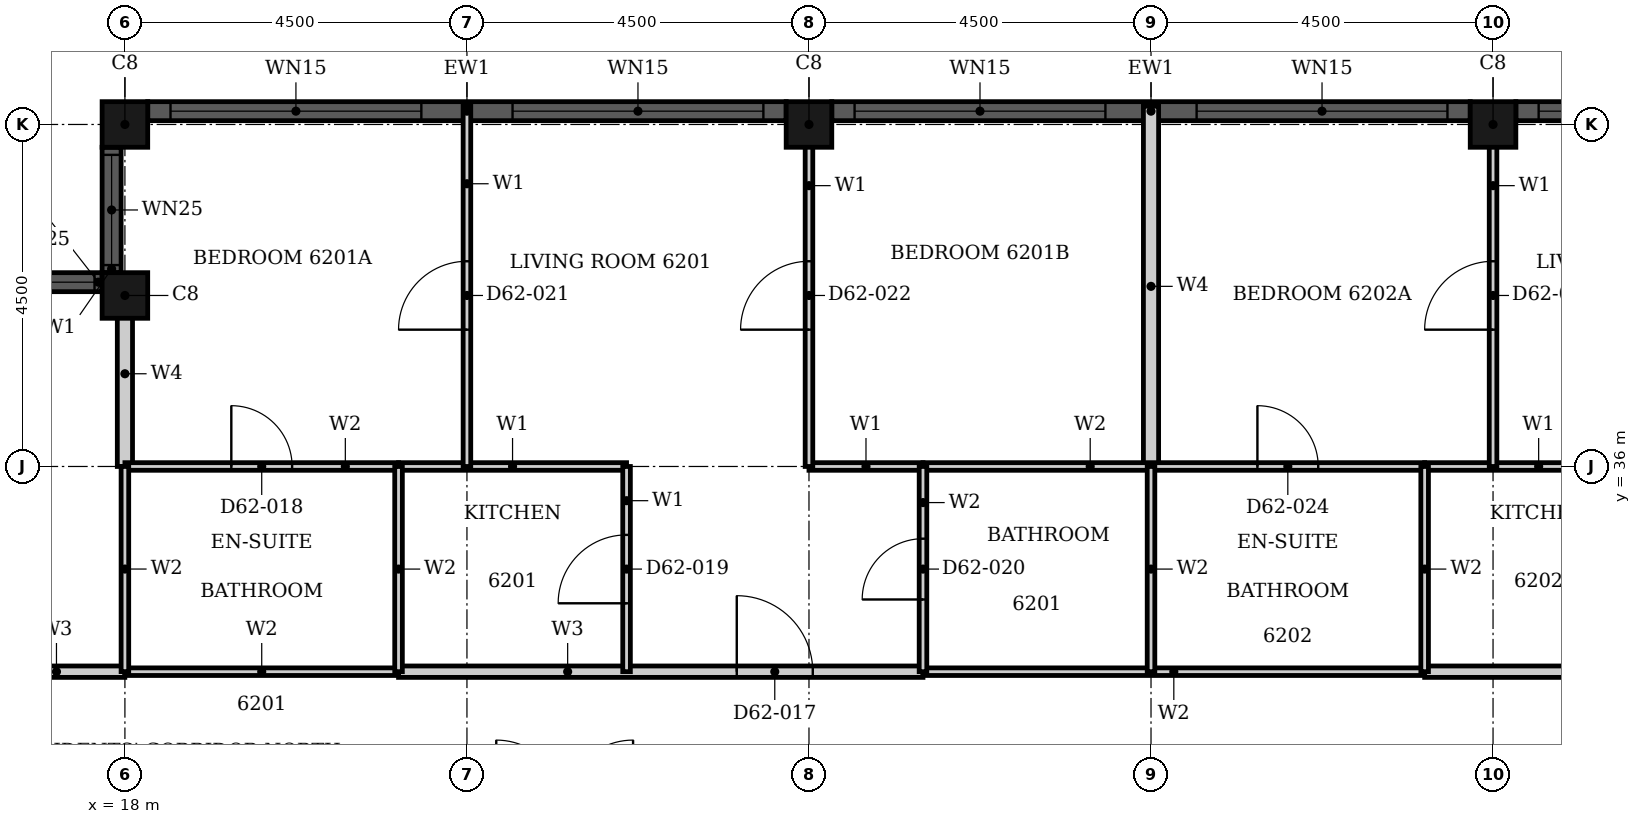
"""IFC4 building model, lengths in metres.
Left out: names, types, materials, properties, quantities, classifications, styles, units other than length and angle.
Written with IfcOpenShell. Run it as: python <this file> out.ifc"""

import sys

from ifc_helpers import new_model, si_unit, direction, frame, frame_2d, origin, origin_2d, place, context, subcontext, project, spatial, rectangle, hollow_rectangle, extrude, element, fill, save


model = new_model("IFC4")
c1 = context("Model", 3, precision=1e-05, world=origin(), true_north=direction((0.0, 1.0)))
c2 = subcontext(c1, "Body", "Model", "MODEL_VIEW")
j1 = project(units=[si_unit("LENGTHUNIT", "METRE"), si_unit("PLANEANGLEUNIT", "RADIAN")], contexts=[c1])
p1 = place(None, origin())
s1 = spatial("IfcSite", under=j1, at=p1, CompositionType="ELEMENT")
p2 = place(p1, origin())
s2 = spatial("IfcBuilding", under=s1, at=p2, CompositionType="ELEMENT")
p3 = place(p2, frame((0.0, 0.0, 245.3)))
s3 = spatial("IfcBuildingStorey", under=s2, at=p3, CompositionType="ELEMENT", Elevation=245.3)
for number, where, z_axis, x_axis in (
    (1, (36.0, 40.5, 0.0), (0.0, 0.0, 1.0), (1.0, 0.0, 0.0)),
    (2, (27.0, 40.5, 0.0), (0.0, 0.0, 1.0), (1.0, 0.0, 0.0)),
    (3, (18.0, 40.5, 0.0), (0.0, 0.0, 1.0), (1.0, 0.0, 0.0)),
    (4, (18.0, 38.25, 0.0), (0.0, 0.0, 1.0), (1.0, 0.0, 0.0)),
):
    element("IfcColumn", number, at=place(p3, frame(where, z_axis=z_axis, x_axis=x_axis)), inside=s3, PredefinedType="COLUMN", context=c2, shape_type="SweptSolid", body=[
        extrude(hollow_rectangle(XDim=0.6, YDim=0.6, WallThickness=0.02, at=origin_2d()), origin(), (0.0, 0.0, 1.0), 3.7),
    ])
p4 = place(p3, frame((44.7, 40.675, 0.0), z_axis=(0.0, 0.0, 1.0), x_axis=(-1.0, 0.0, 0.0)))
e5 = element("IfcWall", 5, at=p4, inside=s3, PredefinedType="SOLIDWALL", context=c2, shape_type="SweptSolid", body=[
    extrude(rectangle(XDim=8.4, YDim=0.25, at=frame_2d((4.2, 0.0))), origin(), (0.0, 0.0, 1.0), 3.7),
])
p5 = place(p4, frame((0.3, 0.0, 0.45)))
e6 = element("IfcOpeningElement", 6, at=p5, cuts=e5, PredefinedType="OPENING", context=c2, shape_type="SweptSolid", body=[
    extrude(rectangle(XDim=3.3, YDim=2.3, at=frame_2d((1.65, 1.15))), frame((0.0, 0.135, 0.0), z_axis=(0.0, -1.0, 0.0), x_axis=(1.0, 0.0, 0.0)), (0.0, 0.0, 1.0), 0.27),
])
p6 = place(p4, frame((4.8, 0.0, 0.45)))
e7 = element("IfcOpeningElement", 7, at=p6, cuts=e5, PredefinedType="OPENING", context=c2, shape_type="SweptSolid", body=[
    extrude(rectangle(XDim=3.3, YDim=2.3, at=frame_2d((1.65, 1.15))), frame((0.0, 0.135, 0.0), z_axis=(0.0, -1.0, 0.0), x_axis=(1.0, 0.0, 0.0)), (0.0, 0.0, 1.0), 0.27),
])
p7 = place(p3, frame((35.7, 40.675, 0.0), z_axis=(0.0, 0.0, 1.0), x_axis=(-1.0, 0.0, 0.0)))
e8 = element("IfcWall", 8, at=p7, inside=s3, PredefinedType="SOLIDWALL", context=c2, shape_type="SweptSolid", body=[
    extrude(rectangle(XDim=8.4, YDim=0.25, at=frame_2d((4.2, 0.0))), origin(), (0.0, 0.0, 1.0), 3.7),
])
p8 = place(p7, frame((0.3, 0.0, 0.45)))
e9 = element("IfcOpeningElement", 9, at=p8, cuts=e8, PredefinedType="OPENING", context=c2, shape_type="SweptSolid", body=[
    extrude(rectangle(XDim=3.3, YDim=2.3, at=frame_2d((1.65, 1.15))), frame((0.0, 0.135, 0.0), z_axis=(0.0, -1.0, 0.0), x_axis=(1.0, 0.0, 0.0)), (0.0, 0.0, 1.0), 0.27),
])
p9 = place(p7, frame((4.8, 0.0, 0.45)))
e10 = element("IfcOpeningElement", 10, at=p9, cuts=e8, PredefinedType="OPENING", context=c2, shape_type="SweptSolid", body=[
    extrude(rectangle(XDim=3.3, YDim=2.3, at=frame_2d((1.65, 1.15))), frame((0.0, 0.135, 0.0), z_axis=(0.0, -1.0, 0.0), x_axis=(1.0, 0.0, 0.0)), (0.0, 0.0, 1.0), 0.27),
])
p10 = place(p3, frame((26.7, 40.675, 0.0), z_axis=(0.0, 0.0, 1.0), x_axis=(-1.0, 0.0, 0.0)))
e11 = element("IfcWall", 11, at=p10, inside=s3, PredefinedType="SOLIDWALL", context=c2, shape_type="SweptSolid", body=[
    extrude(rectangle(XDim=8.4, YDim=0.25, at=frame_2d((4.2, 0.0))), origin(), (0.0, 0.0, 1.0), 3.7),
])
p11 = place(p10, frame((0.3, 0.0, 0.45)))
e12 = element("IfcOpeningElement", 12, at=p11, cuts=e11, PredefinedType="OPENING", context=c2, shape_type="SweptSolid", body=[
    extrude(rectangle(XDim=3.3, YDim=2.3, at=frame_2d((1.65, 1.15))), frame((0.0, 0.135, 0.0), z_axis=(0.0, -1.0, 0.0), x_axis=(1.0, 0.0, 0.0)), (0.0, 0.0, 1.0), 0.27),
])
p12 = place(p10, frame((4.8, 0.0, 0.45)))
e13 = element("IfcOpeningElement", 13, at=p12, cuts=e11, PredefinedType="OPENING", context=c2, shape_type="SweptSolid", body=[
    extrude(rectangle(XDim=3.3, YDim=2.3, at=frame_2d((1.65, 1.15))), frame((0.0, 0.135, 0.0), z_axis=(0.0, -1.0, 0.0), x_axis=(1.0, 0.0, 0.0)), (0.0, 0.0, 1.0), 0.27),
])
p13 = place(p3, frame((17.825, 40.2, 0.0), z_axis=(0.0, 0.0, 1.0), x_axis=(0.0, -1.0, 0.0)))
e14 = element("IfcWall", 14, at=p13, inside=s3, PredefinedType="SOLIDWALL", context=c2, shape_type="SweptSolid", body=[
    extrude(rectangle(XDim=1.65, YDim=0.25, at=frame_2d((0.825, 0.0))), origin(), (0.0, 0.0, 1.0), 3.7),
])
p14 = place(p13, frame((0.1, 0.0, 0.9)))
e15 = element("IfcOpeningElement", 15, at=p14, cuts=e14, PredefinedType="OPENING", context=c2, shape_type="SweptSolid", body=[
    extrude(rectangle(XDim=1.45, YDim=1.85, at=frame_2d((0.725, 0.925))), frame((0.0, 0.135, 0.0), z_axis=(0.0, -1.0, 0.0), x_axis=(1.0, 0.0, 0.0)), (0.0, 0.0, 1.0), 0.27),
])
p15 = place(p3, frame((17.7, 38.425, 0.0), z_axis=(0.0, 0.0, 1.0), x_axis=(-1.0, 0.0, 0.0)))
e16 = element("IfcWall", 16, at=p15, inside=s3, PredefinedType="SOLIDWALL", context=c2, shape_type="SweptSolid", body=[
    extrude(rectangle(XDim=1.65, YDim=0.25, at=frame_2d((0.825, 0.0))), origin(), (0.0, 0.0, 1.0), 3.7),
])
p16 = place(p15, frame((0.1, 0.0, 0.9)))
e17 = element("IfcOpeningElement", 17, at=p16, cuts=e16, PredefinedType="OPENING", context=c2, shape_type="SweptSolid", body=[
    extrude(rectangle(XDim=1.45, YDim=1.85, at=frame_2d((0.725, 0.925))), frame((0.0, 0.135, 0.0), z_axis=(0.0, -1.0, 0.0), x_axis=(1.0, 0.0, 0.0)), (0.0, 0.0, 1.0), 0.27),
])
p17 = place(p3, frame((21.6, 33.3, 0.0), z_axis=(0.0, 0.0, 1.0), x_axis=(1.0, 0.0, 0.0)))
e18 = element("IfcWall", 18, at=p17, inside=s3, PredefinedType="PARTITIONING", context=c2, shape_type="SweptSolid", body=[
    extrude(rectangle(XDim=6.9, YDim=0.15, at=frame_2d((3.45, 0.0))), origin(), (0.0, 0.0, 1.0), 3.4),
])
p18 = place(p17, frame((4.45, 0.0, 0.0)))
e19 = element("IfcOpeningElement", 19, at=p18, cuts=e18, PredefinedType="OPENING", context=c2, shape_type="SweptSolid", body=[
    extrude(rectangle(XDim=1.0, YDim=2.2, at=frame_2d((0.5, 1.1))), frame((0.0, 0.085, 0.0), z_axis=(0.0, -1.0, 0.0), x_axis=(1.0, 0.0, 0.0)), (0.0, 0.0, 1.0), 0.17),
])
p19 = place(p3, frame((35.1, 33.3, 0.0), z_axis=(0.0, 0.0, 1.0), x_axis=(1.0, 0.0, 0.0)))
e20 = element("IfcWall", 20, at=p19, inside=s3, PredefinedType="PARTITIONING", context=c2, shape_type="SweptSolid", body=[
    extrude(rectangle(XDim=6.9, YDim=0.15, at=frame_2d((3.45, 0.0))), origin(), (0.0, 0.0, 1.0), 3.4),
])
p20 = place(p19, frame((4.45, 0.0, 0.0)))
e21 = element("IfcOpeningElement", 21, at=p20, cuts=e20, PredefinedType="OPENING", context=c2, shape_type="SweptSolid", body=[
    extrude(rectangle(XDim=1.0, YDim=2.2, at=frame_2d((0.5, 1.1))), frame((0.0, 0.085, 0.0), z_axis=(0.0, -1.0, 0.0), x_axis=(1.0, 0.0, 0.0)), (0.0, 0.0, 1.0), 0.17),
])
p21 = place(p3, frame((16.2, 33.3, 0.0), z_axis=(0.0, 0.0, 1.0), x_axis=(1.0, 0.0, 0.0)))
e22 = element("IfcWall", 22, at=p21, inside=s3, PredefinedType="PARTITIONING", context=c2, shape_type="SweptSolid", body=[
    extrude(rectangle(XDim=1.799, YDim=0.15, at=frame_2d((0.899, 0.0))), origin(), (0.0, 0.0, 1.0), 3.4),
])
p22 = place(p3, frame((27.0, 36.0, 0.0), z_axis=(0.0, 0.0, 1.0), x_axis=(1.0, 0.0, 0.0)))
e23 = element("IfcWall", 23, at=p22, inside=s3, PredefinedType="PARTITIONING", context=c2, shape_type="SweptSolid", body=[
    extrude(rectangle(XDim=1.5, YDim=0.1, at=frame_2d((0.75, 0.0))), origin(), (0.0, 0.0, 1.0), 3.4),
])
for number, where, z_axis, x_axis in (
    (24, (21.6, 36.0, 0.0), (0.0, 0.0, 1.0), (1.0, 0.0, 0.0)),
    (25, (35.1, 36.0, 0.0), (0.0, 0.0, 1.0), (1.0, 0.0, 0.0)),
):
    element("IfcWall", number, at=place(p3, frame(where, z_axis=z_axis, x_axis=x_axis)), inside=s3, PredefinedType="PARTITIONING", context=c2, shape_type="SweptSolid", body=[
        extrude(rectangle(XDim=3.0, YDim=0.1, at=frame_2d((1.5, 0.0))), origin(), (0.0, 0.0, 1.0), 3.4),
    ])
p23 = place(p3, frame((22.5, 36.0, 0.0), z_axis=(0.0, 0.0, 1.0), x_axis=(0.0, 1.0, 0.0)))
e26 = element("IfcWall", 26, at=p23, inside=s3, PredefinedType="PARTITIONING", context=c2, shape_type="SweptSolid", body=[
    extrude(rectangle(XDim=4.74, YDim=0.1, at=frame_2d((2.37, 0.0))), origin(), (0.0, 0.0, 1.0), 3.4),
])
p24 = place(p23, frame((1.8, 0.0, 0.0)))
e27 = element("IfcOpeningElement", 27, at=p24, cuts=e26, PredefinedType="OPENING", context=c2, shape_type="SweptSolid", body=[
    extrude(rectangle(XDim=0.9, YDim=2.1, at=frame_2d((0.45, 1.05))), frame((0.0, 0.06, 0.0), z_axis=(0.0, -1.0, 0.0), x_axis=(1.0, 0.0, 0.0)), (0.0, 0.0, 1.0), 0.12),
])
p25 = place(p3, frame((24.6, 33.3, 0.0), z_axis=(0.0, 0.0, 1.0), x_axis=(0.0, 1.0, 0.0)))
e28 = element("IfcWall", 28, at=p25, inside=s3, PredefinedType="PARTITIONING", context=c2, shape_type="SweptSolid", body=[
    extrude(rectangle(XDim=2.7, YDim=0.1, at=frame_2d((1.35, 0.0))), origin(), (0.0, 0.0, 1.0), 3.4),
])
p26 = place(p25, frame((0.9, 0.0, 0.0)))
e29 = element("IfcOpeningElement", 29, at=p26, cuts=e28, PredefinedType="OPENING", context=c2, shape_type="SweptSolid", body=[
    extrude(rectangle(XDim=0.9, YDim=2.1, at=frame_2d((0.45, 1.05))), frame((0.0, 0.06, 0.0), z_axis=(0.0, -1.0, 0.0), x_axis=(1.0, 0.0, 0.0)), (0.0, 0.0, 1.0), 0.12),
])
p27 = place(p3, frame((27.0, 36.0, 0.0), z_axis=(0.0, 0.0, 1.0), x_axis=(0.0, 1.0, 0.0)))
e30 = element("IfcWall", 30, at=p27, inside=s3, PredefinedType="PARTITIONING", context=c2, shape_type="SweptSolid", body=[
    extrude(rectangle(XDim=4.69, YDim=0.1, at=frame_2d((2.345, 0.0))), origin(), (0.0, 0.0, 1.0), 3.4),
])
p28 = place(p27, frame((1.8, 0.0, 0.0)))
e31 = element("IfcOpeningElement", 31, at=p28, cuts=e30, PredefinedType="OPENING", context=c2, shape_type="SweptSolid", body=[
    extrude(rectangle(XDim=0.9, YDim=2.1, at=frame_2d((0.45, 1.05))), frame((0.0, 0.06, 0.0), z_axis=(0.0, -1.0, 0.0), x_axis=(1.0, 0.0, 0.0)), (0.0, 0.0, 1.0), 0.12),
])
p29 = place(p3, frame((36.0, 36.0, 0.0), z_axis=(0.0, 0.0, 1.0), x_axis=(0.0, 1.0, 0.0)))
e32 = element("IfcWall", 32, at=p29, inside=s3, PredefinedType="PARTITIONING", context=c2, shape_type="SweptSolid", body=[
    extrude(rectangle(XDim=4.69, YDim=0.1, at=frame_2d((2.345, 0.0))), origin(), (0.0, 0.0, 1.0), 3.4),
])
p30 = place(p29, frame((1.8, 0.0, 0.0)))
e33 = element("IfcOpeningElement", 33, at=p30, cuts=e32, PredefinedType="OPENING", context=c2, shape_type="SweptSolid", body=[
    extrude(rectangle(XDim=0.9, YDim=2.1, at=frame_2d((0.45, 1.05))), frame((0.0, 0.06, 0.0), z_axis=(0.0, -1.0, 0.0), x_axis=(1.0, 0.0, 0.0)), (0.0, 0.0, 1.0), 0.12),
])
p31 = place(p3, frame((18.0, 36.0, 0.0), z_axis=(0.0, 0.0, 1.0), x_axis=(0.0, 1.0, 0.0)))
e34 = element("IfcWall", 34, at=p31, inside=s3, PredefinedType="PARTITIONING", context=c2, shape_type="SweptSolid", body=[
    extrude(rectangle(XDim=2.44, YDim=0.2, at=frame_2d((1.22, 0.0))), origin(), (0.0, 0.0, 1.0), 3.4),
])
p32 = place(p3, frame((31.5, 36.0, 0.0), z_axis=(0.0, 0.0, 1.0), x_axis=(0.0, 1.0, 0.0)))
e35 = element("IfcWall", 35, at=p32, inside=s3, PredefinedType="PARTITIONING", context=c2, shape_type="SweptSolid", body=[
    extrude(rectangle(XDim=4.74, YDim=0.2, at=frame_2d((2.37, 0.0))), origin(), (0.0, 0.0, 1.0), 3.4),
])
p33 = place(p3, frame((28.5, 33.3, 0.0), z_axis=(0.0, 0.0, 1.0), x_axis=(1.0, 0.0, 0.0)))
e36 = element("IfcWall", 36, at=p33, inside=s3, PredefinedType="PARTITIONING", context=c2, shape_type="SweptSolid", body=[
    extrude(rectangle(XDim=6.6, YDim=0.1, at=frame_2d((3.3, 0.0))), origin(), (0.0, 0.0, 1.0), 3.4),
])
p34 = place(p3, frame((18.0, 33.3, 0.0), z_axis=(0.0, 0.0, 1.0), x_axis=(1.0, 0.0, 0.0)))
e37 = element("IfcWall", 37, at=p34, inside=s3, PredefinedType="PARTITIONING", context=c2, shape_type="SweptSolid", body=[
    extrude(rectangle(XDim=3.6, YDim=0.1, at=frame_2d((1.8, 0.0))), origin(), (0.0, 0.0, 1.0), 3.4),
])
p35 = place(p3, frame((28.5, 36.0, 0.0), z_axis=(0.0, 0.0, 1.0), x_axis=(1.0, 0.0, 0.0)))
e38 = element("IfcWall", 38, at=p35, inside=s3, PredefinedType="PARTITIONING", context=c2, shape_type="SweptSolid", body=[
    extrude(rectangle(XDim=6.6, YDim=0.1, at=frame_2d((3.3, 0.0))), origin(), (0.0, 0.0, 1.0), 3.4),
])
p36 = place(p35, frame((4.4, 0.0, 0.0)))
e39 = element("IfcOpeningElement", 39, at=p36, cuts=e38, PredefinedType="OPENING", context=c2, shape_type="SweptSolid", body=[
    extrude(rectangle(XDim=0.8, YDim=2.1, at=frame_2d((0.4, 1.05))), frame((0.0, 0.06, 0.0), z_axis=(0.0, -1.0, 0.0), x_axis=(1.0, 0.0, 0.0)), (0.0, 0.0, 1.0), 0.12),
])
p37 = place(p3, frame((18.0, 36.0, 0.0), z_axis=(0.0, 0.0, 1.0), x_axis=(1.0, 0.0, 0.0)))
e40 = element("IfcWall", 40, at=p37, inside=s3, PredefinedType="PARTITIONING", context=c2, shape_type="SweptSolid", body=[
    extrude(rectangle(XDim=3.6, YDim=0.1, at=frame_2d((1.8, 0.0))), origin(), (0.0, 0.0, 1.0), 3.4),
])
p38 = place(p37, frame((1.4, 0.0, 0.0)))
e41 = element("IfcOpeningElement", 41, at=p38, cuts=e40, PredefinedType="OPENING", context=c2, shape_type="SweptSolid", body=[
    extrude(rectangle(XDim=0.8, YDim=2.1, at=frame_2d((0.4, 1.05))), frame((0.0, 0.06, 0.0), z_axis=(0.0, -1.0, 0.0), x_axis=(1.0, 0.0, 0.0)), (0.0, 0.0, 1.0), 0.12),
])
p39 = place(p3, frame((18.0, 33.301, 0.0), z_axis=(0.0, 0.0, 1.0), x_axis=(0.0, 1.0, 0.0)))
e42 = element("IfcWall", 42, at=p39, inside=s3, PredefinedType="PARTITIONING", context=c2, shape_type="SweptSolid", body=[
    extrude(rectangle(XDim=2.699, YDim=0.1, at=frame_2d((1.35, 0.0))), origin(), (0.0, 0.0, 1.0), 3.4),
])
p40 = place(p3, frame((21.6, 33.3, 0.0), z_axis=(0.0, 0.0, 1.0), x_axis=(0.0, 1.0, 0.0)))
e43 = element("IfcWall", 43, at=p40, inside=s3, PredefinedType="PARTITIONING", context=c2, shape_type="SweptSolid", body=[
    extrude(rectangle(XDim=2.7, YDim=0.1, at=frame_2d((1.35, 0.0))), origin(), (0.0, 0.0, 1.0), 3.4),
])
p41 = place(p3, frame((28.5, 33.3, 0.0), z_axis=(0.0, 0.0, 1.0), x_axis=(0.0, 1.0, 0.0)))
e44 = element("IfcWall", 44, at=p41, inside=s3, PredefinedType="PARTITIONING", context=c2, shape_type="SweptSolid", body=[
    extrude(rectangle(XDim=2.7, YDim=0.1, at=frame_2d((1.35, 0.0))), origin(), (0.0, 0.0, 1.0), 3.4),
])
p42 = place(p41, frame((0.95, 0.0, 0.0)))
e45 = element("IfcOpeningElement", 45, at=p42, cuts=e44, PredefinedType="OPENING", context=c2, shape_type="SweptSolid", body=[
    extrude(rectangle(XDim=0.8, YDim=2.1, at=frame_2d((0.4, 1.05))), frame((0.0, 0.06, 0.0), z_axis=(0.0, -1.0, 0.0), x_axis=(1.0, 0.0, 0.0)), (0.0, 0.0, 1.0), 0.12),
])
for number, where, z_axis, x_axis in (
    (46, (31.5, 33.3, 0.0), (0.0, 0.0, 1.0), (0.0, 1.0, 0.0)),
    (47, (35.1, 33.3, 0.0), (0.0, 0.0, 1.0), (0.0, 1.0, 0.0)),
):
    element("IfcWall", number, at=place(p3, frame(where, z_axis=z_axis, x_axis=x_axis)), inside=s3, PredefinedType="PARTITIONING", context=c2, shape_type="SweptSolid", body=[
        extrude(rectangle(XDim=2.7, YDim=0.1, at=frame_2d((1.35, 0.0))), origin(), (0.0, 0.0, 1.0), 3.4),
    ])
p43 = place(p6, origin())
e48 = element("IfcWindow", 48, at=p43, inside=s3, PartitioningType="SINGLE_PANEL", PredefinedType="WINDOW", context=c2, shape_type="SweptSolid", body=[
    extrude(rectangle(XDim=3.3, YDim=2.3, at=frame_2d((1.65, 1.15))), frame((0.0, 0.03, 0.0), z_axis=(0.0, -1.0, 0.0), x_axis=(1.0, 0.0, 0.0)), (0.0, 0.0, 1.0), 0.06),
])
fill(e7, e48)
p44 = place(p8, origin())
e49 = element("IfcWindow", 49, at=p44, inside=s3, PartitioningType="SINGLE_PANEL", PredefinedType="WINDOW", context=c2, shape_type="SweptSolid", body=[
    extrude(rectangle(XDim=3.3, YDim=2.3, at=frame_2d((1.65, 1.15))), frame((0.0, 0.03, 0.0), z_axis=(0.0, -1.0, 0.0), x_axis=(1.0, 0.0, 0.0)), (0.0, 0.0, 1.0), 0.06),
])
fill(e9, e49)
p45 = place(p9, origin())
e50 = element("IfcWindow", 50, at=p45, inside=s3, PartitioningType="SINGLE_PANEL", PredefinedType="WINDOW", context=c2, shape_type="SweptSolid", body=[
    extrude(rectangle(XDim=3.3, YDim=2.3, at=frame_2d((1.65, 1.15))), frame((0.0, 0.03, 0.0), z_axis=(0.0, -1.0, 0.0), x_axis=(1.0, 0.0, 0.0)), (0.0, 0.0, 1.0), 0.06),
])
fill(e10, e50)
p46 = place(p11, origin())
e51 = element("IfcWindow", 51, at=p46, inside=s3, PartitioningType="SINGLE_PANEL", PredefinedType="WINDOW", context=c2, shape_type="SweptSolid", body=[
    extrude(rectangle(XDim=3.3, YDim=2.3, at=frame_2d((1.65, 1.15))), frame((0.0, 0.03, 0.0), z_axis=(0.0, -1.0, 0.0), x_axis=(1.0, 0.0, 0.0)), (0.0, 0.0, 1.0), 0.06),
])
fill(e12, e51)
p47 = place(p12, origin())
e52 = element("IfcWindow", 52, at=p47, inside=s3, PartitioningType="SINGLE_PANEL", PredefinedType="WINDOW", context=c2, shape_type="SweptSolid", body=[
    extrude(rectangle(XDim=3.3, YDim=2.3, at=frame_2d((1.65, 1.15))), frame((0.0, 0.03, 0.0), z_axis=(0.0, -1.0, 0.0), x_axis=(1.0, 0.0, 0.0)), (0.0, 0.0, 1.0), 0.06),
])
fill(e13, e52)
p48 = place(p14, origin())
e53 = element("IfcWindow", 53, at=p48, inside=s3, PartitioningType="SINGLE_PANEL", PredefinedType="WINDOW", context=c2, shape_type="SweptSolid", body=[
    extrude(rectangle(XDim=1.45, YDim=1.85, at=frame_2d((0.725, 0.925))), frame((0.0, 0.03, 0.0), z_axis=(0.0, -1.0, 0.0), x_axis=(1.0, 0.0, 0.0)), (0.0, 0.0, 1.0), 0.06),
])
fill(e15, e53)
p49 = place(p16, origin())
e54 = element("IfcWindow", 54, at=p49, inside=s3, PartitioningType="SINGLE_PANEL", PredefinedType="WINDOW", context=c2, shape_type="SweptSolid", body=[
    extrude(rectangle(XDim=1.45, YDim=1.85, at=frame_2d((0.725, 0.925))), frame((0.0, 0.03, 0.0), z_axis=(0.0, -1.0, 0.0), x_axis=(1.0, 0.0, 0.0)), (0.0, 0.0, 1.0), 0.06),
])
fill(e17, e54)
p50 = place(p18, origin())
e55 = element("IfcDoor", 55, at=p50, inside=s3, OperationType="SINGLE_SWING_LEFT", PredefinedType="DOOR", context=c2, shape_type="SweptSolid", body=[
    extrude(rectangle(XDim=1.0, YDim=2.2, at=frame_2d((0.5, 1.1))), frame((0.0, 0.025, 0.0), z_axis=(0.0, -1.0, 0.0), x_axis=(1.0, 0.0, 0.0)), (0.0, 0.0, 1.0), 0.05),
])
fill(e19, e55)
p51 = place(p38, origin())
e56 = element("IfcDoor", 56, at=p51, inside=s3, OperationType="SINGLE_SWING_LEFT", PredefinedType="DOOR", context=c2, shape_type="SweptSolid", body=[
    extrude(rectangle(XDim=0.8, YDim=2.1, at=frame_2d((0.4, 1.05))), frame((0.0, 0.025, 0.0), z_axis=(0.0, -1.0, 0.0), x_axis=(1.0, 0.0, 0.0)), (0.0, 0.0, 1.0), 0.05),
])
fill(e41, e56)
p52 = place(p26, origin())
e57 = element("IfcDoor", 57, at=p52, inside=s3, OperationType="SINGLE_SWING_LEFT", PredefinedType="DOOR", context=c2, shape_type="SweptSolid", body=[
    extrude(rectangle(XDim=0.9, YDim=2.1, at=frame_2d((0.45, 1.05))), frame((0.0, 0.025, 0.0), z_axis=(0.0, -1.0, 0.0), x_axis=(1.0, 0.0, 0.0)), (0.0, 0.0, 1.0), 0.05),
])
fill(e29, e57)
p53 = place(p42, origin())
e58 = element("IfcDoor", 58, at=p53, inside=s3, OperationType="SINGLE_SWING_LEFT", PredefinedType="DOOR", context=c2, shape_type="SweptSolid", body=[
    extrude(rectangle(XDim=0.8, YDim=2.1, at=frame_2d((0.4, 1.05))), frame((0.0, 0.025, 0.0), z_axis=(0.0, -1.0, 0.0), x_axis=(1.0, 0.0, 0.0)), (0.0, 0.0, 1.0), 0.05),
])
fill(e45, e58)
p54 = place(p24, origin())
e59 = element("IfcDoor", 59, at=p54, inside=s3, OperationType="SINGLE_SWING_RIGHT", PredefinedType="DOOR", context=c2, shape_type="SweptSolid", body=[
    extrude(rectangle(XDim=0.9, YDim=2.1, at=frame_2d((0.45, 1.05))), frame((0.0, 0.025, 0.0), z_axis=(0.0, -1.0, 0.0), x_axis=(1.0, 0.0, 0.0)), (0.0, 0.0, 1.0), 0.05),
])
fill(e27, e59)
p55 = place(p28, origin())
e60 = element("IfcDoor", 60, at=p55, inside=s3, OperationType="SINGLE_SWING_RIGHT", PredefinedType="DOOR", context=c2, shape_type="SweptSolid", body=[
    extrude(rectangle(XDim=0.9, YDim=2.1, at=frame_2d((0.45, 1.05))), frame((0.0, 0.025, 0.0), z_axis=(0.0, -1.0, 0.0), x_axis=(1.0, 0.0, 0.0)), (0.0, 0.0, 1.0), 0.05),
])
fill(e31, e60)
p56 = place(p36, origin())
e61 = element("IfcDoor", 61, at=p56, inside=s3, OperationType="SINGLE_SWING_LEFT", PredefinedType="DOOR", context=c2, shape_type="SweptSolid", body=[
    extrude(rectangle(XDim=0.8, YDim=2.1, at=frame_2d((0.4, 1.05))), frame((0.0, 0.025, 0.0), z_axis=(0.0, -1.0, 0.0), x_axis=(1.0, 0.0, 0.0)), (0.0, 0.0, 1.0), 0.05),
])
fill(e39, e61)
p57 = place(p30, origin())
e62 = element("IfcDoor", 62, at=p57, inside=s3, OperationType="SINGLE_SWING_LEFT", PredefinedType="DOOR", context=c2, shape_type="SweptSolid", body=[
    extrude(rectangle(XDim=0.9, YDim=2.1, at=frame_2d((0.45, 1.05))), frame((0.0, 0.025, 0.0), z_axis=(0.0, -1.0, 0.0), x_axis=(1.0, 0.0, 0.0)), (0.0, 0.0, 1.0), 0.05),
])
fill(e33, e62)
save(model, sys.argv[1])
